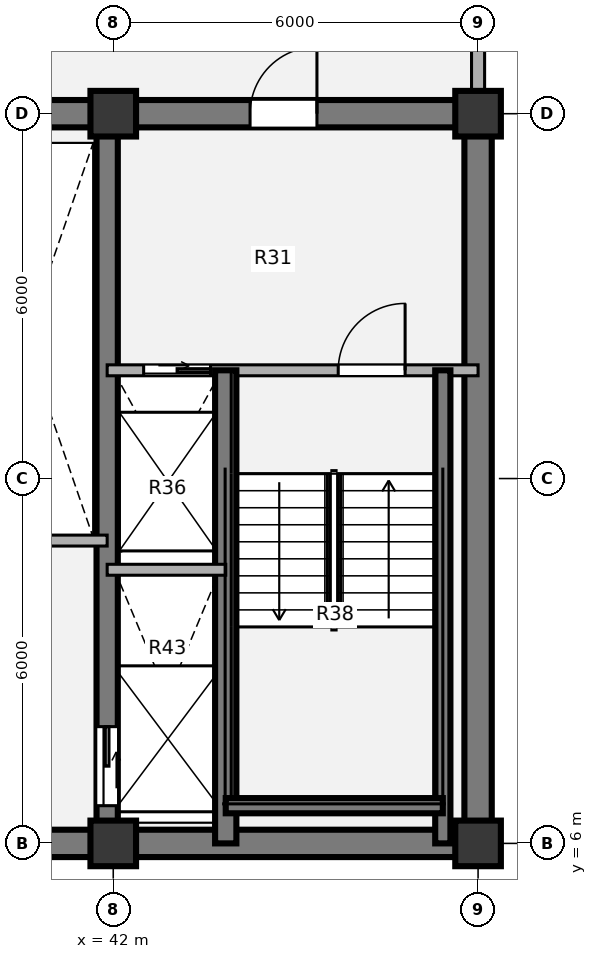
"""IFC4 building model, lengths in metres.
Left out: names, types, materials, properties, quantities, classifications, styles, units other than length and angle.
Written with IfcOpenShell. Run it as: python <this file> out.ifc"""

import sys

from ifc_helpers import new_model, si_unit, direction, frame, frame_2d, origin, origin_2d, place, context, subcontext, project, spatial, rectangle, extrude, source, transform, mapped, element, fill, save


model = new_model("IFC4")
c1 = context("Model", 3, precision=1e-05, world=origin(), true_north=direction((0.0, 1.0)))
c2 = subcontext(c1, "Body", "Model", "MODEL_VIEW")
j1 = project(units=[si_unit("LENGTHUNIT", "METRE"), si_unit("PLANEANGLEUNIT", "RADIAN")], contexts=[c1])
p1 = place(None, origin())
s1 = spatial("IfcSite", under=j1, at=p1, CompositionType="ELEMENT")
p2 = place(p1, origin())
s2 = spatial("IfcBuilding", under=s1, at=p2, CompositionType="ELEMENT")
p3 = place(p2, frame((0.0, 0.0, 156.42)))
s3 = spatial("IfcBuildingStorey", under=s2, at=p3, CompositionType="ELEMENT", Elevation=156.42)
m1 = source(origin(), c2, "Body", "SweptSolid", [
    extrude(rectangle(XDim=0.75, YDim=0.75, at=origin_2d()), origin(), (0.0, 0.0, 1.0), 3.78),
])
for number, where, z_axis, x_axis in (
    (1, (42.0, 6.0, 0.0), (0.0, 0.0, 1.0), (1.0, 0.0, 0.0)),
    (2, (48.0, 6.0, 0.0), (0.0, 0.0, 1.0), (1.0, 0.0, 0.0)),
    (3, (42.0, 18.0, 0.0), (0.0, 0.0, 1.0), (1.0, 0.0, 0.0)),
    (4, (48.0, 18.0, 0.0), (0.0, 0.0, 1.0), (1.0, 0.0, 0.0)),
):
    element("IfcColumn", number, at=place(p3, frame(where, z_axis=z_axis, x_axis=x_axis)), inside=s3, PredefinedType="COLUMN", context=c2, shape_type="MappedRepresentation", body=[
        mapped(m1, transform((0.0, 0.0, 0.0), x_axis=(1.0, 0.0, 0.0), y_axis=(0.0, 1.0, 0.0), z_axis=(0.0, 0.0, 1.0), scale=1.0)),
    ])
p4 = place(p3, frame((48.225, 6.0, 0.0), z_axis=(0.0, 0.0, 1.0), x_axis=(-1.0, 0.0, 0.0)))
e5 = element("IfcWall", 5, at=p4, inside=s3, PredefinedType="SHEAR", context=c2, shape_type="SweptSolid", body=[
    extrude(rectangle(XDim=24.45, YDim=0.45, at=frame_2d((12.225, 0.0))), origin(), (0.0, 0.0, 1.0), 3.78),
])
p5 = place(p3, frame((48.0, 18.0, 0.0), z_axis=(0.0, 0.0, 1.0), x_axis=(0.0, -1.0, 0.0)))
e6 = element("IfcWall", 6, at=p5, inside=s3, PredefinedType="SHEAR", context=c2, shape_type="SweptSolid", body=[
    extrude(rectangle(XDim=12.0, YDim=0.45, at=frame_2d((6.0, 0.0))), origin(), (0.0, 0.0, 1.0), 3.78),
])
p6 = place(p3, frame((38.8, 18.0, 0.0), z_axis=(0.0, 0.0, 1.0), x_axis=(1.0, 0.0, 0.0)))
e7 = element("IfcWall", 7, at=p6, inside=s3, PredefinedType="SHEAR", context=c2, shape_type="SweptSolid", body=[
    extrude(rectangle(XDim=9.425, YDim=0.45, at=frame_2d((4.712, 0.0))), origin(), (0.0, 0.0, 1.0), 3.78),
])
p7 = place(p6, frame((5.45, 0.0, 0.0)))
e8 = element("IfcOpeningElement", 8, at=p7, cuts=e7, PredefinedType="OPENING", context=c2, shape_type="SweptSolid", body=[
    extrude(rectangle(XDim=1.1, YDim=2.1, at=origin_2d()), frame((0.55, 0.235, 1.05), z_axis=(0.0, -1.0, 0.0), x_axis=(1.0, 0.0, 0.0)), (0.0, 0.0, 1.0), 0.47),
])
p8 = place(p3, frame((41.9, 18.0, 0.0), z_axis=(0.0, 0.0, 1.0), x_axis=(0.0, -1.0, 0.0)))
e9 = element("IfcWall", 9, at=p8, inside=s3, PredefinedType="SHEAR", context=c2, shape_type="SweptSolid", body=[
    extrude(rectangle(XDim=12.0, YDim=0.35, at=frame_2d((6.0, 0.0))), origin(), (0.0, 0.0, 1.0), 3.78),
])
p9 = place(p8, frame((10.08, 0.0, 0.0)))
e10 = element("IfcOpeningElement", 10, at=p9, cuts=e9, PredefinedType="OPENING", context=c2, shape_type="SweptSolid", body=[
    extrude(rectangle(XDim=1.3, YDim=2.1, at=origin_2d()), frame((0.65, 0.185, 1.05), z_axis=(0.0, -1.0, 0.0), x_axis=(1.0, 0.0, 0.0)), (0.0, 0.0, 1.0), 0.37),
])
p10 = place(p3, frame((48.0, 21.05, 0.0), z_axis=(0.0, 0.0, 1.0), x_axis=(0.0, -1.0, 0.0)))
e11 = element("IfcWall", 11, at=p10, inside=s3, PredefinedType="SOLIDWALL", context=c2, shape_type="SweptSolid", body=[
    extrude(rectangle(XDim=2.695, YDim=0.215, at=frame_2d((1.348, 0.0))), origin(), (0.0, 0.0, 1.0), 2.718),
])
p11 = place(p3, frame((39.35, 10.98, 0.0), z_axis=(0.0, 0.0, 1.0), x_axis=(1.0, 0.0, 0.0)))
e12 = element("IfcWall", 12, at=p11, inside=s3, PredefinedType="PARTITIONING", context=c2, shape_type="SweptSolid", body=[
    extrude(rectangle(XDim=2.55, YDim=0.18, at=frame_2d((1.275, 0.0))), origin(), (0.0, 0.0, 1.0), 3.5),
])
p12 = place(p3, frame((41.9, 13.78, 0.0), z_axis=(0.0, 0.0, 1.0), x_axis=(1.0, 0.0, 0.0)))
e13 = element("IfcWall", 13, at=p12, inside=s3, PredefinedType="PARTITIONING", context=c2, shape_type="SweptSolid", body=[
    extrude(rectangle(XDim=6.1, YDim=0.18, at=frame_2d((3.05, 0.0))), origin(), (0.0, 0.0, 1.0), 3.5),
])
p13 = place(p12, frame((0.6, 0.0, 0.0)))
e14 = element("IfcOpeningElement", 14, at=p13, cuts=e13, PredefinedType="OPENING", context=c2, shape_type="SweptSolid", body=[
    extrude(rectangle(XDim=1.1, YDim=2.1, at=origin_2d()), frame((0.55, 0.1, 1.05), z_axis=(0.0, -1.0, 0.0), x_axis=(1.0, 0.0, 0.0)), (0.0, 0.0, 1.0), 0.2),
])
p14 = place(p12, frame((3.8, 0.0, 0.0)))
e15 = element("IfcOpeningElement", 15, at=p14, cuts=e13, PredefinedType="OPENING", context=c2, shape_type="SweptSolid", body=[
    extrude(rectangle(XDim=1.1, YDim=2.1, at=origin_2d()), frame((0.55, 0.1, 1.05), z_axis=(0.0, -1.0, 0.0), x_axis=(1.0, 0.0, 0.0)), (0.0, 0.0, 1.0), 0.2),
])
p15 = place(p3, frame((43.85, 6.0, 0.0), z_axis=(0.0, 0.0, 1.0), x_axis=(0.0, 1.0, 0.0)))
e16 = element("IfcWall", 16, at=p15, inside=s3, PredefinedType="SHEAR", context=c2, shape_type="SweptSolid", body=[
    extrude(rectangle(XDim=7.78, YDim=0.35, at=frame_2d((3.89, 0.0))), origin(), (0.0, 0.0, 1.0), 3.85),
])
p16 = place(p3, frame((47.42, 6.0, 0.0), z_axis=(0.0, 0.0, 1.0), x_axis=(0.0, 1.0, 0.0)))
e17 = element("IfcWall", 17, at=p16, inside=s3, PredefinedType="SHEAR", context=c2, shape_type="SweptSolid", body=[
    extrude(rectangle(XDim=7.78, YDim=0.25, at=frame_2d((3.89, 0.0))), origin(), (0.0, 0.0, 1.0), 3.85),
])
p17 = place(p3, frame((43.85, 6.62, 0.0), z_axis=(0.0, 0.0, 1.0), x_axis=(1.0, 0.0, 0.0)))
e18 = element("IfcWall", 18, at=p17, inside=s3, PredefinedType="SHEAR", context=c2, shape_type="SweptSolid", body=[
    extrude(rectangle(XDim=3.57, YDim=0.25, at=frame_2d((1.785, 0.0))), origin(), (0.0, 0.0, 1.0), 3.85),
])
p18 = place(p3, frame((41.9, 10.5, 0.0), z_axis=(0.0, 0.0, 1.0), x_axis=(1.0, 0.0, 0.0)))
e19 = element("IfcWall", 19, at=p18, inside=s3, PredefinedType="PARTITIONING", context=c2, shape_type="SweptSolid", body=[
    extrude(rectangle(XDim=1.95, YDim=0.18, at=frame_2d((0.975, 0.0))), origin(), (0.0, 0.0, 1.0), 3.5),
])
m2 = source(origin(), c2, "Body", "SweptSolid", [
    extrude(rectangle(XDim=1.1, YDim=2.1, at=origin_2d()), frame((0.55, 0.025, 1.05), z_axis=(0.0, -1.0, 0.0), x_axis=(1.0, 0.0, 0.0)), (0.0, 0.0, 1.0), 0.05),
])
p19 = place(p13, origin())
e20 = element("IfcDoor", 20, at=p19, inside=s3, OperationType="SLIDING_TO_RIGHT", PredefinedType="DOOR", context=c2, shape_type="MappedRepresentation", body=[
    mapped(m2, transform((0.0, 0.0, 0.0), x_axis=(1.0, 0.0, 0.0), y_axis=(0.0, 1.0, 0.0), z_axis=(0.0, 0.0, 1.0), scale=1.0)),
])
fill(e14, e20)
m3 = source(origin(), c2, "Body", "SweptSolid", [
    extrude(rectangle(XDim=1.1, YDim=2.1, at=origin_2d()), frame((0.55, 0.025, 1.05), z_axis=(0.0, -1.0, 0.0), x_axis=(1.0, 0.0, 0.0)), (0.0, 0.0, 1.0), 0.05),
])
p20 = place(p14, origin())
e21 = element("IfcDoor", 21, at=p20, inside=s3, OperationType="SINGLE_SWING_RIGHT", PredefinedType="DOOR", context=c2, shape_type="MappedRepresentation", body=[
    mapped(m3, transform((0.0, 0.0, 0.0), x_axis=(1.0, 0.0, 0.0), y_axis=(0.0, 1.0, 0.0), z_axis=(0.0, 0.0, 1.0), scale=1.0)),
])
fill(e15, e21)
m4 = source(origin(), c2, "Body", "SweptSolid", [
    extrude(rectangle(XDim=1.3, YDim=2.1, at=origin_2d()), frame((0.65, 0.025, 1.05), z_axis=(0.0, -1.0, 0.0), x_axis=(1.0, 0.0, 0.0)), (0.0, 0.0, 1.0), 0.05),
])
p21 = place(p9, origin())
e22 = element("IfcDoor", 22, at=p21, inside=s3, OperationType="SLIDING_TO_LEFT", PredefinedType="DOOR", context=c2, shape_type="MappedRepresentation", body=[
    mapped(m4, transform((0.0, 0.0, 0.0), x_axis=(1.0, 0.0, 0.0), y_axis=(0.0, 1.0, 0.0), z_axis=(0.0, 0.0, 1.0), scale=1.0)),
])
fill(e10, e22)
m5 = source(origin(), c2, "Body", "SweptSolid", [
    extrude(rectangle(XDim=1.1, YDim=2.1, at=origin_2d()), frame((0.55, 0.025, 1.05), z_axis=(0.0, -1.0, 0.0), x_axis=(1.0, 0.0, 0.0)), (0.0, 0.0, 1.0), 0.05),
])
p22 = place(p7, origin())
e23 = element("IfcDoor", 23, at=p22, inside=s3, OperationType="SINGLE_SWING_RIGHT", PredefinedType="DOOR", context=c2, shape_type="MappedRepresentation", body=[
    mapped(m5, transform((0.0, 0.0, 0.0), x_axis=(1.0, 0.0, 0.0), y_axis=(0.0, 1.0, 0.0), z_axis=(0.0, 0.0, 1.0), scale=1.0)),
])
fill(e8, e23)
save(model, sys.argv[1])
